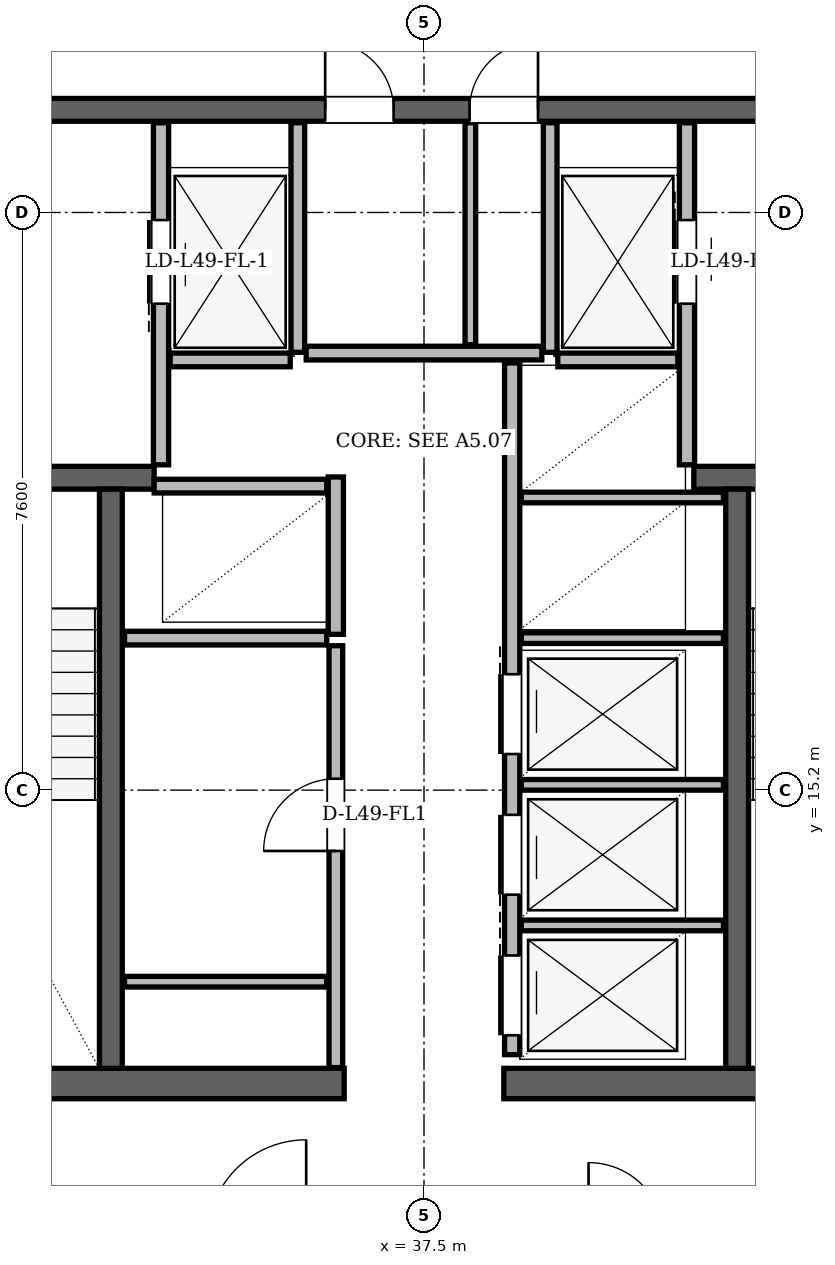
"""IFC4 building model, lengths in metres.
Left out: names, types, materials, properties, quantities, classifications, styles, units other than length and angle.
Written with IfcOpenShell. Run it as: python <this file> out.ifc"""

import sys

from ifc_helpers import new_model, si_unit, direction, frame, frame_2d, origin, place, context, subcontext, project, spatial, rectangle, extrude, element, fill, save


model = new_model("IFC4")
c1 = context("Model", 3, precision=1e-05, world=origin(), true_north=direction((0.0, 1.0)))
c2 = subcontext(c1, "Body", "Model", "MODEL_VIEW")
j1 = project(units=[si_unit("LENGTHUNIT", "METRE"), si_unit("PLANEANGLEUNIT", "RADIAN")], contexts=[c1])
p1 = place(None, origin())
s1 = spatial("IfcSite", under=j1, at=p1, CompositionType="ELEMENT")
p2 = place(p1, origin())
s2 = spatial("IfcBuilding", under=s1, at=p2, CompositionType="ELEMENT")
p3 = place(p2, frame((0.0, 0.0, 185.4)))
s3 = spatial("IfcBuildingStorey", under=s2, at=p3, CompositionType="ELEMENT", Elevation=185.4)
for number, where, z_axis, x_axis in (
    (1, (29.35, 11.34, 0.0), (0.0, 0.0, 1.0), (1.0, 0.0, 0.0)),
    (2, (38.55, 11.34, 0.0), (0.0, 0.0, 1.0), (1.0, 0.0, 0.0)),
):
    element("IfcWall", number, at=place(p3, frame(where, z_axis=z_axis, x_axis=x_axis)), inside=s3, PredefinedType="SHEAR", context=c2, shape_type="SweptSolid", body=[
        extrude(rectangle(XDim=7.1, YDim=0.4, at=frame_2d((3.55, 0.0))), origin(), (0.0, 0.0, 1.0), 3.34),
    ])
p4 = place(p3, frame((29.65, 24.15, 0.0), z_axis=(0.0, 0.0, 1.0), x_axis=(1.0, 0.0, 0.0)))
e3 = element("IfcWall", 3, at=p4, inside=s3, PredefinedType="SHEAR", context=c2, shape_type="SweptSolid", body=[
    extrude(rectangle(XDim=15.7, YDim=0.3, at=frame_2d((7.85, 0.0))), origin(), (0.0, 0.0, 1.0), 3.34),
])
p5 = place(p4, frame((1.7, 0.0, 0.0)))
e4 = element("IfcOpeningElement", 4, at=p5, cuts=e3, PredefinedType="OPENING", context=c2, shape_type="SweptSolid", body=[
    extrude(rectangle(XDim=1.2, YDim=2.2, at=frame_2d((0.6, 1.1))), frame((0.0, 0.15, 0.0), z_axis=(0.0, -1.0, 0.0), x_axis=(1.0, 0.0, 0.0)), (0.0, 0.0, 1.0), 0.3),
])
p6 = place(p4, frame((12.8, 0.0, 0.0)))
e5 = element("IfcOpeningElement", 5, at=p6, cuts=e3, PredefinedType="OPENING", context=c2, shape_type="SweptSolid", body=[
    extrude(rectangle(XDim=1.2, YDim=2.2, at=frame_2d((0.6, 1.1))), frame((0.0, 0.15, 0.0), z_axis=(0.0, -1.0, 0.0), x_axis=(1.0, 0.0, 0.0)), (0.0, 0.0, 1.0), 0.3),
])
p7 = place(p4, frame((6.55, 0.0, 0.0)))
e6 = element("IfcOpeningElement", 6, at=p7, cuts=e3, PredefinedType="OPENING", context=c2, shape_type="SweptSolid", body=[
    extrude(rectangle(XDim=0.9, YDim=2.05, at=frame_2d((0.45, 1.025))), frame((0.0, 0.15, 0.0), z_axis=(0.0, -1.0, 0.0), x_axis=(1.0, 0.0, 0.0)), (0.0, 0.0, 1.0), 0.3),
])
p8 = place(p4, frame((8.45, 0.0, 0.0)))
e7 = element("IfcOpeningElement", 7, at=p8, cuts=e3, PredefinedType="OPENING", context=c2, shape_type="SweptSolid", body=[
    extrude(rectangle(XDim=0.9, YDim=2.05, at=frame_2d((0.45, 1.025))), frame((0.0, 0.15, 0.0), z_axis=(0.0, -1.0, 0.0), x_axis=(1.0, 0.0, 0.0)), (0.0, 0.0, 1.0), 0.3),
])
p9 = place(p3, frame((29.94, 19.31, 0.0), z_axis=(0.0, 0.0, 1.0), x_axis=(1.0, 0.0, 0.0)))
e8 = element("IfcWall", 8, at=p9, inside=s3, PredefinedType="SHEAR", context=c2, shape_type="SweptSolid", body=[
    extrude(rectangle(XDim=4.01, YDim=0.3, at=frame_2d((2.005, 0.0))), origin(), (0.0, 0.0, 1.0), 3.34),
])
p10 = place(p9, frame((1.01, 0.0, 0.0)))
e9 = element("IfcOpeningElement", 9, at=p10, cuts=e8, PredefinedType="OPENING", context=c2, shape_type="SweptSolid", body=[
    extrude(rectangle(XDim=1.4, YDim=2.2, at=frame_2d((0.7, 1.1))), frame((0.0, 0.15, 0.0), z_axis=(0.0, -1.0, 0.0), x_axis=(1.0, 0.0, 0.0)), (0.0, 0.0, 1.0), 0.3),
])
p11 = place(p3, frame((41.05, 19.31, 0.0), z_axis=(0.0, 0.0, 1.0), x_axis=(1.0, 0.0, 0.0)))
e10 = element("IfcWall", 10, at=p11, inside=s3, PredefinedType="SHEAR", context=c2, shape_type="SweptSolid", body=[
    extrude(rectangle(XDim=4.01, YDim=0.3, at=frame_2d((2.005, 0.0))), origin(), (0.0, 0.0, 1.0), 3.34),
])
p12 = place(p11, frame((1.6, 0.0, 0.0)))
e11 = element("IfcOpeningElement", 11, at=p12, cuts=e10, PredefinedType="OPENING", context=c2, shape_type="SweptSolid", body=[
    extrude(rectangle(XDim=1.4, YDim=2.2, at=frame_2d((0.7, 1.1))), frame((0.0, 0.15, 0.0), z_axis=(0.0, -1.0, 0.0), x_axis=(1.0, 0.0, 0.0)), (0.0, 0.0, 1.0), 0.3),
])
for number, where, z_axis, x_axis in (
    (12, (33.38, 11.54, 0.0), (0.0, 0.0, 1.0), (0.0, 1.0, 0.0)),
    (13, (41.62, 11.54, 0.0), (0.0, 0.0, 1.0), (0.0, 1.0, 0.0)),
):
    element("IfcWall", number, at=place(p3, frame(where, z_axis=z_axis, x_axis=x_axis)), inside=s3, PredefinedType="SHEAR", context=c2, shape_type="SweptSolid", body=[
        extrude(rectangle(XDim=7.62, YDim=0.3, at=frame_2d((3.81, 0.0))), origin(), (0.0, 0.0, 1.0), 3.34),
    ])
p13 = place(p3, frame((59.519, 11.962, 0.0), z_axis=(0.0, 0.0, 1.0), x_axis=(-0.500007042689, 0.866021337648, 0.0)))
e14 = element("IfcWall", 14, at=p13, inside=s3, PredefinedType="SOLIDWALL", context=c2, shape_type="SweptSolid", body=[
    extrude(rectangle(XDim=36.115, YDim=0.29, at=frame_2d((18.057, 0.0))), origin(), (0.0, 0.0, 1.0), 2.56),
])
p14 = place(p13, frame((8.034, 0.0, 0.0)))
e15 = element("IfcOpeningElement", 15, at=p14, cuts=e14, PredefinedType="OPENING", context=c2, shape_type="SweptSolid", body=[
    extrude(rectangle(XDim=1.5, YDim=2.2, at=frame_2d((0.75, 1.1))), frame((0.0, 0.145, 0.0), z_axis=(0.0, -1.0, 0.0), x_axis=(1.0, 0.0, 0.0)), (0.0, 0.0, 1.0), 0.29),
])
p15 = place(p13, frame((28.035, 0.0, 0.0)))
e16 = element("IfcOpeningElement", 16, at=p15, cuts=e14, PredefinedType="OPENING", context=c2, shape_type="SweptSolid", body=[
    extrude(rectangle(XDim=1.5, YDim=2.2, at=frame_2d((0.75, 1.1))), frame((0.0, 0.145, 0.0), z_axis=(0.0, -1.0, 0.0), x_axis=(1.0, 0.0, 0.0)), (0.0, 0.0, 1.0), 0.29),
])
p16 = place(p13, frame((2.16, 0.0, 0.85)))
e17 = element("IfcOpeningElement", 17, at=p16, cuts=e14, PredefinedType="OPENING", context=c2, shape_type="SweptSolid", body=[
    extrude(rectangle(XDim=1.4, YDim=1.6, at=frame_2d((0.7, 0.8))), frame((0.0, 0.145, 0.0), z_axis=(0.0, -1.0, 0.0), x_axis=(1.0, 0.0, 0.0)), (0.0, 0.0, 1.0), 0.29),
])
p17 = place(p13, frame((14.363, 0.0, 0.85)))
e18 = element("IfcOpeningElement", 18, at=p17, cuts=e14, PredefinedType="OPENING", context=c2, shape_type="SweptSolid", body=[
    extrude(rectangle(XDim=1.2, YDim=1.48, at=frame_2d((0.6, 0.74))), frame((0.0, 0.145, 0.0), z_axis=(0.0, -1.0, 0.0), x_axis=(1.0, 0.0, 0.0)), (0.0, 0.0, 1.0), 0.29),
])
p18 = place(p13, frame((21.574, 0.0, 0.85)))
e19 = element("IfcOpeningElement", 19, at=p18, cuts=e14, PredefinedType="OPENING", context=c2, shape_type="SweptSolid", body=[
    extrude(rectangle(XDim=2.8, YDim=1.6, at=frame_2d((1.4, 0.8))), frame((0.0, 0.145, 0.0), z_axis=(0.0, -1.0, 0.0), x_axis=(1.0, 0.0, 0.0)), (0.0, 0.0, 1.0), 0.29),
])
p19 = place(p13, frame((32.304, 0.0, 0.85)))
e20 = element("IfcOpeningElement", 20, at=p19, cuts=e14, PredefinedType="OPENING", context=c2, shape_type="SweptSolid", body=[
    extrude(rectangle(XDim=1.6, YDim=1.6, at=frame_2d((0.8, 0.8))), frame((0.0, 0.145, 0.0), z_axis=(0.0, -1.0, 0.0), x_axis=(1.0, 0.0, 0.0)), (0.0, 0.0, 1.0), 0.29),
])
p20 = place(p3, frame((33.539, 43.238, 0.0), z_axis=(0.0, 0.0, 1.0), x_axis=(-0.500007042689, -0.866021337648, 0.0)))
e21 = element("IfcWall", 21, at=p20, inside=s3, PredefinedType="SOLIDWALL", context=c2, shape_type="SweptSolid", body=[
    extrude(rectangle(XDim=36.115, YDim=0.29, at=frame_2d((18.057, 0.0))), origin(), (0.0, 0.0, 1.0), 2.56),
])
p21 = place(p20, frame((8.034, 0.0, 0.0)))
e22 = element("IfcOpeningElement", 22, at=p21, cuts=e21, PredefinedType="OPENING", context=c2, shape_type="SweptSolid", body=[
    extrude(rectangle(XDim=1.5, YDim=2.2, at=frame_2d((0.75, 1.1))), frame((0.0, 0.145, 0.0), z_axis=(0.0, -1.0, 0.0), x_axis=(1.0, 0.0, 0.0)), (0.0, 0.0, 1.0), 0.29),
])
p22 = place(p20, frame((28.035, 0.0, 0.0)))
e23 = element("IfcOpeningElement", 23, at=p22, cuts=e21, PredefinedType="OPENING", context=c2, shape_type="SweptSolid", body=[
    extrude(rectangle(XDim=1.5, YDim=2.2, at=frame_2d((0.75, 1.1))), frame((0.0, 0.145, 0.0), z_axis=(0.0, -1.0, 0.0), x_axis=(1.0, 0.0, 0.0)), (0.0, 0.0, 1.0), 0.29),
])
p23 = place(p20, frame((33.831, 0.0, 0.85)))
e24 = element("IfcOpeningElement", 24, at=p23, cuts=e21, PredefinedType="OPENING", context=c2, shape_type="SweptSolid", body=[
    extrude(rectangle(XDim=1.2, YDim=1.48, at=frame_2d((0.6, 0.74))), frame((0.0, 0.145, 0.0), z_axis=(0.0, -1.0, 0.0), x_axis=(1.0, 0.0, 0.0)), (0.0, 0.0, 1.0), 0.29),
])
p24 = place(p20, frame((18.648, 0.0, 0.85)))
e25 = element("IfcOpeningElement", 25, at=p24, cuts=e21, PredefinedType="OPENING", context=c2, shape_type="SweptSolid", body=[
    extrude(rectangle(XDim=2.0, YDim=1.6, at=frame_2d((1.0, 0.8))), frame((0.0, 0.145, 0.0), z_axis=(0.0, -1.0, 0.0), x_axis=(1.0, 0.0, 0.0)), (0.0, 0.0, 1.0), 0.29),
])
p25 = place(p20, frame((26.235, 0.0, 0.85)))
e26 = element("IfcOpeningElement", 26, at=p25, cuts=e21, PredefinedType="OPENING", context=c2, shape_type="SweptSolid", body=[
    extrude(rectangle(XDim=1.2, YDim=1.48, at=frame_2d((0.6, 0.74))), frame((0.0, 0.145, 0.0), z_axis=(0.0, -1.0, 0.0), x_axis=(1.0, 0.0, 0.0)), (0.0, 0.0, 1.0), 0.29),
])
p26 = place(p20, frame((15.622, 0.0, 0.85)))
e27 = element("IfcOpeningElement", 27, at=p26, cuts=e21, PredefinedType="OPENING", context=c2, shape_type="SweptSolid", body=[
    extrude(rectangle(XDim=1.2, YDim=1.48, at=frame_2d((0.6, 0.74))), frame((0.0, 0.145, 0.0), z_axis=(0.0, -1.0, 0.0), x_axis=(1.0, 0.0, 0.0)), (0.0, 0.0, 1.0), 0.29),
])
p27 = place(p20, frame((6.537, 0.0, 0.85)))
e28 = element("IfcOpeningElement", 28, at=p27, cuts=e21, PredefinedType="OPENING", context=c2, shape_type="SweptSolid", body=[
    extrude(rectangle(XDim=1.2, YDim=1.48, at=frame_2d((0.6, 0.74))), frame((0.0, 0.145, 0.0), z_axis=(0.0, -1.0, 0.0), x_axis=(1.0, 0.0, 0.0)), (0.0, 0.0, 1.0), 0.29),
])
p28 = place(p20, frame((13.204, 0.0, 0.85)))
e29 = element("IfcOpeningElement", 29, at=p28, cuts=e21, PredefinedType="OPENING", context=c2, shape_type="SweptSolid", body=[
    extrude(rectangle(XDim=1.6, YDim=1.6, at=frame_2d((0.8, 0.8))), frame((0.0, 0.145, 0.0), z_axis=(0.0, -1.0, 0.0), x_axis=(1.0, 0.0, 0.0)), (0.0, 0.0, 1.0), 0.29),
])
p29 = place(p20, frame((1.107, 0.0, 0.85)))
e30 = element("IfcOpeningElement", 30, at=p29, cuts=e21, PredefinedType="OPENING", context=c2, shape_type="SweptSolid", body=[
    extrude(rectangle(XDim=2.0, YDim=1.6, at=frame_2d((1.0, 0.8))), frame((0.0, 0.145, 0.0), z_axis=(0.0, -1.0, 0.0), x_axis=(1.0, 0.0, 0.0)), (0.0, 0.0, 1.0), 0.29),
])
p30 = place(p3, frame((34.04, 19.48, 0.0), z_axis=(0.0, 0.0, 1.0), x_axis=(0.0, 1.0, 0.0)))
e31 = element("IfcWall", 31, at=p30, inside=s3, PredefinedType="PARTITIONING", context=c2, shape_type="SweptSolid", body=[
    extrude(rectangle(XDim=4.5, YDim=0.2, at=frame_2d((2.25, 0.0))), origin(), (0.0, 0.0, 1.0), 3.34),
])
p31 = place(p30, frame((2.12, 0.0, 0.0)))
e32 = element("IfcOpeningElement", 32, at=p31, cuts=e31, PredefinedType="OPENING", context=c2, shape_type="SweptSolid", body=[
    extrude(rectangle(XDim=1.1, YDim=2.2, at=frame_2d((0.55, 1.1))), frame((0.0, 0.1, 0.0), z_axis=(0.0, -1.0, 0.0), x_axis=(1.0, 0.0, 0.0)), (0.0, 0.0, 1.0), 0.2),
])
p32 = place(p3, frame((35.84, 20.96, 0.0), z_axis=(0.0, 0.0, 1.0), x_axis=(0.0, 1.0, 0.0)))
e33 = element("IfcWall", 33, at=p32, inside=s3, PredefinedType="PARTITIONING", context=c2, shape_type="SweptSolid", body=[
    extrude(rectangle(XDim=3.02, YDim=0.18, at=frame_2d((1.51, 0.0))), origin(), (0.0, 0.0, 1.0), 3.34),
])
p33 = place(p3, frame((34.16, 20.86, 0.0), z_axis=(0.0, 0.0, 1.0), x_axis=(1.0, 0.0, 0.0)))
e34 = element("IfcWall", 34, at=p33, inside=s3, PredefinedType="PARTITIONING", context=c2, shape_type="SweptSolid", body=[
    extrude(rectangle(XDim=1.58, YDim=0.18, at=frame_2d((0.79, 0.0))), origin(), (0.0, 0.0, 1.0), 3.34),
])
p34 = place(p3, frame((40.96, 19.48, 0.0), z_axis=(0.0, 0.0, 1.0), x_axis=(0.0, 1.0, 0.0)))
e35 = element("IfcWall", 35, at=p34, inside=s3, PredefinedType="PARTITIONING", context=c2, shape_type="SweptSolid", body=[
    extrude(rectangle(XDim=4.5, YDim=0.2, at=frame_2d((2.25, 0.0))), origin(), (0.0, 0.0, 1.0), 3.34),
])
p35 = place(p34, frame((2.12, 0.0, 0.0)))
e36 = element("IfcOpeningElement", 36, at=p35, cuts=e35, PredefinedType="OPENING", context=c2, shape_type="SweptSolid", body=[
    extrude(rectangle(XDim=1.1, YDim=2.2, at=frame_2d((0.55, 1.1))), frame((0.0, 0.1, 0.0), z_axis=(0.0, -1.0, 0.0), x_axis=(1.0, 0.0, 0.0)), (0.0, 0.0, 1.0), 0.2),
])
p36 = place(p3, frame((39.16, 20.96, 0.0), z_axis=(0.0, 0.0, 1.0), x_axis=(0.0, 1.0, 0.0)))
e37 = element("IfcWall", 37, at=p36, inside=s3, PredefinedType="PARTITIONING", context=c2, shape_type="SweptSolid", body=[
    extrude(rectangle(XDim=3.02, YDim=0.18, at=frame_2d((1.51, 0.0))), origin(), (0.0, 0.0, 1.0), 3.34),
])
p37 = place(p3, frame((39.26, 20.86, 0.0), z_axis=(0.0, 0.0, 1.0), x_axis=(1.0, 0.0, 0.0)))
e38 = element("IfcWall", 38, at=p37, inside=s3, PredefinedType="PARTITIONING", context=c2, shape_type="SweptSolid", body=[
    extrude(rectangle(XDim=1.58, YDim=0.18, at=frame_2d((0.79, 0.0))), origin(), (0.0, 0.0, 1.0), 3.34),
])
p38 = place(p3, frame((36.34, 17.25, 0.0), z_axis=(0.0, 0.0, 1.0), x_axis=(0.0, 1.0, 0.0)))
e39 = element("IfcWall", 39, at=p38, inside=s3, PredefinedType="PARTITIONING", context=c2, shape_type="SweptSolid", body=[
    extrude(rectangle(XDim=2.07, YDim=0.2, at=frame_2d((1.035, 0.0))), origin(), (0.0, 0.0, 1.0), 3.34),
])
p39 = place(p3, frame((33.95, 19.2, 0.0), z_axis=(0.0, 0.0, 1.0), x_axis=(1.0, 0.0, 0.0)))
e40 = element("IfcWall", 40, at=p39, inside=s3, PredefinedType="PARTITIONING", context=c2, shape_type="SweptSolid", body=[
    extrude(rectangle(XDim=2.27, YDim=0.18, at=frame_2d((1.135, 0.0))), origin(), (0.0, 0.0, 1.0), 3.34),
])
p40 = place(p3, frame((33.56, 17.2, 0.0), z_axis=(0.0, 0.0, 1.0), x_axis=(1.0, 0.0, 0.0)))
e41 = element("IfcWall", 41, at=p40, inside=s3, PredefinedType="PARTITIONING", context=c2, shape_type="SweptSolid", body=[
    extrude(rectangle(XDim=2.66, YDim=0.18, at=frame_2d((1.33, 0.0))), origin(), (0.0, 0.0, 1.0), 3.34),
])
p41 = place(p3, frame((36.34, 11.55, 0.0), z_axis=(0.0, 0.0, 1.0), x_axis=(0.0, 1.0, 0.0)))
e42 = element("IfcWall", 42, at=p41, inside=s3, PredefinedType="PARTITIONING", context=c2, shape_type="SweptSolid", body=[
    extrude(rectangle(XDim=5.55, YDim=0.18, at=frame_2d((2.775, 0.0))), origin(), (0.0, 0.0, 1.0), 3.34),
])
p42 = place(p41, frame((2.85, 0.0, 0.0)))
e43 = element("IfcOpeningElement", 43, at=p42, cuts=e42, PredefinedType="OPENING", context=c2, shape_type="SweptSolid", body=[
    extrude(rectangle(XDim=0.95, YDim=2.1, at=frame_2d((0.475, 1.05))), frame((0.0, 0.09, 0.0), z_axis=(0.0, -1.0, 0.0), x_axis=(1.0, 0.0, 0.0)), (0.0, 0.0, 1.0), 0.18),
])
p43 = place(p3, frame((33.56, 12.68, 0.0), z_axis=(0.0, 0.0, 1.0), x_axis=(1.0, 0.0, 0.0)))
e44 = element("IfcWall", 44, at=p43, inside=s3, PredefinedType="PARTITIONING", context=c2, shape_type="SweptSolid", body=[
    extrude(rectangle(XDim=2.66, YDim=0.14, at=frame_2d((1.33, 0.0))), origin(), (0.0, 0.0, 1.0), 3.34),
])
p44 = place(p3, frame((38.66, 11.72, 0.0), z_axis=(0.0, 0.0, 1.0), x_axis=(0.0, 1.0, 0.0)))
e45 = element("IfcWall", 45, at=p44, inside=s3, PredefinedType="PARTITIONING", context=c2, shape_type="SweptSolid", body=[
    extrude(rectangle(XDim=9.1, YDim=0.2, at=frame_2d((4.55, 0.0))), origin(), (0.0, 0.0, 1.0), 3.34),
])
p45 = place(p44, frame((0.255, 0.0, 0.0)))
e46 = element("IfcOpeningElement", 46, at=p45, cuts=e45, PredefinedType="OPENING", context=c2, shape_type="SweptSolid", body=[
    extrude(rectangle(XDim=1.05, YDim=2.15, at=frame_2d((0.525, 1.075))), frame((0.0, 0.1, 0.0), z_axis=(0.0, -1.0, 0.0), x_axis=(1.0, 0.0, 0.0)), (0.0, 0.0, 1.0), 0.2),
])
p46 = place(p44, frame((2.105, 0.0, 0.0)))
e47 = element("IfcOpeningElement", 47, at=p46, cuts=e45, PredefinedType="OPENING", context=c2, shape_type="SweptSolid", body=[
    extrude(rectangle(XDim=1.05, YDim=2.15, at=frame_2d((0.525, 1.075))), frame((0.0, 0.1, 0.0), z_axis=(0.0, -1.0, 0.0), x_axis=(1.0, 0.0, 0.0)), (0.0, 0.0, 1.0), 0.2),
])
p47 = place(p44, frame((3.955, 0.0, 0.0)))
e48 = element("IfcOpeningElement", 48, at=p47, cuts=e45, PredefinedType="OPENING", context=c2, shape_type="SweptSolid", body=[
    extrude(rectangle(XDim=1.05, YDim=2.15, at=frame_2d((0.525, 1.075))), frame((0.0, 0.1, 0.0), z_axis=(0.0, -1.0, 0.0), x_axis=(1.0, 0.0, 0.0)), (0.0, 0.0, 1.0), 0.2),
])
for number, where, z_axis, x_axis in (
    (49, (38.78, 13.42, 0.0), (0.0, 0.0, 1.0), (1.0, 0.0, 0.0)),
    (50, (38.78, 15.27, 0.0), (0.0, 0.0, 1.0), (1.0, 0.0, 0.0)),
    (51, (38.78, 17.2, 0.0), (0.0, 0.0, 1.0), (1.0, 0.0, 0.0)),
    (52, (38.78, 19.05, 0.0), (0.0, 0.0, 1.0), (1.0, 0.0, 0.0)),
):
    element("IfcWall", number, at=place(p3, frame(where, z_axis=z_axis, x_axis=x_axis)), inside=s3, PredefinedType="PARTITIONING", context=c2, shape_type="SweptSolid", body=[
        extrude(rectangle(XDim=2.66, YDim=0.14, at=frame_2d((1.33, 0.0))), origin(), (0.0, 0.0, 1.0), 3.34),
    ])
p48 = place(p3, frame((35.95, 20.95, 0.0), z_axis=(0.0, 0.0, 1.0), x_axis=(1.0, 0.0, 0.0)))
e53 = element("IfcWall", 53, at=p48, inside=s3, PredefinedType="PARTITIONING", context=c2, shape_type="SweptSolid", body=[
    extrude(rectangle(XDim=3.1, YDim=0.18, at=frame_2d((1.55, 0.0))), origin(), (0.0, 0.0, 1.0), 3.34),
])
p49 = place(p3, frame((38.11, 21.06, 0.0), z_axis=(0.0, 0.0, 1.0), x_axis=(0.0, 1.0, 0.0)))
e54 = element("IfcWall", 54, at=p49, inside=s3, PredefinedType="PARTITIONING", context=c2, shape_type="SweptSolid", body=[
    extrude(rectangle(XDim=2.92, YDim=0.14, at=frame_2d((1.46, 0.0))), origin(), (0.0, 0.0, 1.0), 3.34),
])
p50 = place(p42, origin())
e55 = element("IfcDoor", 55, at=p50, inside=s3, OperationType="SINGLE_SWING_LEFT", PredefinedType="DOOR", context=c2, shape_type="SweptSolid", body=[
    extrude(rectangle(XDim=0.95, YDim=2.1, at=frame_2d((0.475, 1.05))), frame((0.0, 0.025, 0.0), z_axis=(0.0, -1.0, 0.0), x_axis=(1.0, 0.0, 0.0)), (0.0, 0.0, 1.0), 0.05),
])
fill(e43, e55)
p51 = place(p31, origin())
e56 = element("IfcDoor", 56, at=p51, inside=s3, OperationType="SLIDING_TO_LEFT", PredefinedType="DOOR", context=c2, shape_type="SweptSolid", body=[
    extrude(rectangle(XDim=1.1, YDim=2.2, at=frame_2d((0.55, 1.1))), frame((0.0, 0.025, 0.0), z_axis=(0.0, -1.0, 0.0), x_axis=(1.0, 0.0, 0.0)), (0.0, 0.0, 1.0), 0.05),
])
fill(e32, e56)
p52 = place(p35, origin())
e57 = element("IfcDoor", 57, at=p52, inside=s3, OperationType="SLIDING_TO_RIGHT", PredefinedType="DOOR", context=c2, shape_type="SweptSolid", body=[
    extrude(rectangle(XDim=1.1, YDim=2.2, at=frame_2d((0.55, 1.1))), frame((0.0, 0.025, 0.0), z_axis=(0.0, -1.0, 0.0), x_axis=(1.0, 0.0, 0.0)), (0.0, 0.0, 1.0), 0.05),
])
fill(e36, e57)
p53 = place(p45, origin())
e58 = element("IfcDoor", 58, at=p53, inside=s3, OperationType="SLIDING_TO_RIGHT", PredefinedType="DOOR", context=c2, shape_type="SweptSolid", body=[
    extrude(rectangle(XDim=1.05, YDim=2.15, at=frame_2d((0.525, 1.075))), frame((0.0, 0.025, 0.0), z_axis=(0.0, -1.0, 0.0), x_axis=(1.0, 0.0, 0.0)), (0.0, 0.0, 1.0), 0.05),
])
fill(e46, e58)
p54 = place(p46, origin())
e59 = element("IfcDoor", 59, at=p54, inside=s3, OperationType="SLIDING_TO_LEFT", PredefinedType="DOOR", context=c2, shape_type="SweptSolid", body=[
    extrude(rectangle(XDim=1.05, YDim=2.15, at=frame_2d((0.525, 1.075))), frame((0.0, 0.025, 0.0), z_axis=(0.0, -1.0, 0.0), x_axis=(1.0, 0.0, 0.0)), (0.0, 0.0, 1.0), 0.05),
])
fill(e47, e59)
p55 = place(p47, origin())
e60 = element("IfcDoor", 60, at=p55, inside=s3, OperationType="SLIDING_TO_RIGHT", PredefinedType="DOOR", context=c2, shape_type="SweptSolid", body=[
    extrude(rectangle(XDim=1.05, YDim=2.15, at=frame_2d((0.525, 1.075))), frame((0.0, 0.025, 0.0), z_axis=(0.0, -1.0, 0.0), x_axis=(1.0, 0.0, 0.0)), (0.0, 0.0, 1.0), 0.05),
])
fill(e48, e60)
p56 = place(p7, origin())
e61 = element("IfcDoor", 61, at=p56, inside=s3, OperationType="SINGLE_SWING_LEFT", PredefinedType="DOOR", context=c2, shape_type="SweptSolid", body=[
    extrude(rectangle(XDim=0.9, YDim=2.05, at=frame_2d((0.45, 1.025))), frame((0.0, 0.025, 0.0), z_axis=(0.0, -1.0, 0.0), x_axis=(1.0, 0.0, 0.0)), (0.0, 0.0, 1.0), 0.05),
])
fill(e6, e61)
p57 = place(p8, origin())
e62 = element("IfcDoor", 62, at=p57, inside=s3, OperationType="SINGLE_SWING_RIGHT", PredefinedType="DOOR", context=c2, shape_type="SweptSolid", body=[
    extrude(rectangle(XDim=0.9, YDim=2.05, at=frame_2d((0.45, 1.025))), frame((0.0, 0.025, 0.0), z_axis=(0.0, -1.0, 0.0), x_axis=(1.0, 0.0, 0.0)), (0.0, 0.0, 1.0), 0.05),
])
fill(e7, e62)
save(model, sys.argv[1])
